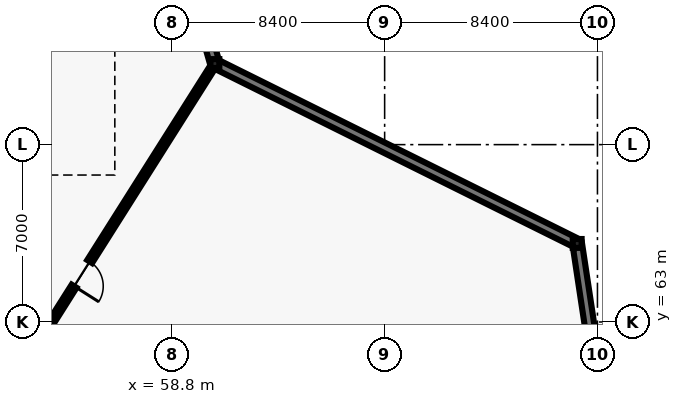
"""IFC4 building model, lengths in metres.
Left out: names, types, materials, properties, quantities, classifications, styles, units other than length and angle.
Written with IfcOpenShell. Run it as: python <this file> out.ifc"""

import sys

from ifc_helpers import new_model, si_unit, direction, frame, frame_2d, origin, origin_2d, place, context, subcontext, project, spatial, rectangle, i_section, extrude, element, fill, save


model = new_model("IFC4")
c1 = context("Model", 3, precision=1e-05, world=origin(), true_north=direction((0.0, 1.0)))
c2 = subcontext(c1, "Body", "Model", "MODEL_VIEW")
j1 = project(units=[si_unit("LENGTHUNIT", "METRE"), si_unit("PLANEANGLEUNIT", "RADIAN")], contexts=[c1])
p1 = place(None, origin())
s1 = spatial("IfcSite", under=j1, at=p1, CompositionType="ELEMENT")
p2 = place(p1, origin())
s2 = spatial("IfcBuilding", under=s1, at=p2, CompositionType="ELEMENT")
p3 = place(p2, frame((0.0, 0.0, -4.5)))
s3 = spatial("IfcBuildingStorey", under=s2, at=p3, CompositionType="ELEMENT", Elevation=-4.5)
for number, where, z_axis, x_axis in (
    (1, (60.5, 73.2, 0.0), (0.0, 0.0, 1.0), (1.0, 0.0, 0.0)),
    (2, (74.8, 66.1, 0.0), (0.0, 0.0, 1.0), (1.0, 0.0, 0.0)),
):
    element("IfcColumn", number, at=place(p3, frame(where, z_axis=z_axis, x_axis=x_axis)), inside=s3, PredefinedType="COLUMN", context=c2, shape_type="SweptSolid", body=[
        extrude(i_section(OverallWidth=0.35, OverallDepth=0.35, WebThickness=0.02, FlangeThickness=0.028, at=origin_2d()), origin(), (0.0, 0.0, 1.0), 4.5),
    ])
p4 = place(p3, frame((77.493, 48.249, 0.0), z_axis=(0.0, 0.0, 1.0), x_axis=(-0.149164377012, 0.988812413267, 0.0)))
e3 = element("IfcWall", 3, at=p4, inside=s3, PredefinedType="USERDEFINED", context=c2, shape_type="SweptSolid", body=[
    extrude(rectangle(XDim=18.053, YDim=0.38, at=frame_2d((9.026, 0.0))), origin(), (0.0, 0.0, 1.0), 4.14),
])
p5 = place(p3, frame((74.8, 66.1, 0.0), z_axis=(0.0, 0.0, 1.0), x_axis=(-0.895672359878, 0.44471454187, 0.0)))
e4 = element("IfcWall", 4, at=p5, inside=s3, PredefinedType="USERDEFINED", context=c2, shape_type="SweptSolid", body=[
    extrude(rectangle(XDim=15.916, YDim=0.38, at=frame_2d((7.958, 0.0))), origin(), (0.0, 0.0, 1.0), 4.14),
])
p6 = place(p3, frame((60.486, 73.248, 0.0), z_axis=(0.0, 0.0, 1.0), x_axis=(-0.27604330243, 0.961145199844, 0.0)))
e5 = element("IfcWall", 5, at=p6, inside=s3, PredefinedType="USERDEFINED", context=c2, shape_type="SweptSolid", body=[
    extrude(rectangle(XDim=9.68, YDim=0.38, at=frame_2d((4.84, 0.0))), origin(), (0.0, 0.0, 1.0), 4.14),
])
p7 = place(p3, frame((60.5, 73.2, 0.0), z_axis=(0.0, 0.0, 1.0), x_axis=(-0.534570878454, -0.845123645338, 0.0)))
e6 = element("IfcWall", 6, at=p7, inside=s3, PredefinedType="SOLIDWALL", context=c2, shape_type="SweptSolid", body=[
    extrude(rectangle(XDim=19.642, YDim=0.225, at=frame_2d((9.821, 0.0))), origin(), (0.0, 0.0, 1.0), 4.14),
])
p8 = place(p7, frame((9.246, 0.0, 0.0)))
e7 = element("IfcOpeningElement", 7, at=p8, cuts=e6, PredefinedType="OPENING", context=c2, shape_type="SweptSolid", body=[
    extrude(rectangle(XDim=1.15, YDim=2.2, at=frame_2d((0.575, 1.1))), frame((0.0, 0.123, 0.0), z_axis=(0.0, -1.0, 0.0), x_axis=(1.0, 0.0, 0.0)), (0.0, 0.0, 1.0), 0.245),
])
p9 = place(p8, origin())
e8 = element("IfcDoor", 8, at=p9, inside=s3, OperationType="SINGLE_SWING_RIGHT", PredefinedType="DOOR", context=c2, shape_type="SweptSolid", body=[
    extrude(rectangle(XDim=1.15, YDim=2.2, at=frame_2d((0.575, 1.1))), frame((0.0, 0.025, 0.0), z_axis=(0.0, -1.0, 0.0), x_axis=(1.0, 0.0, 0.0)), (0.0, 0.0, 1.0), 0.05),
])
fill(e7, e8)
save(model, sys.argv[1])
